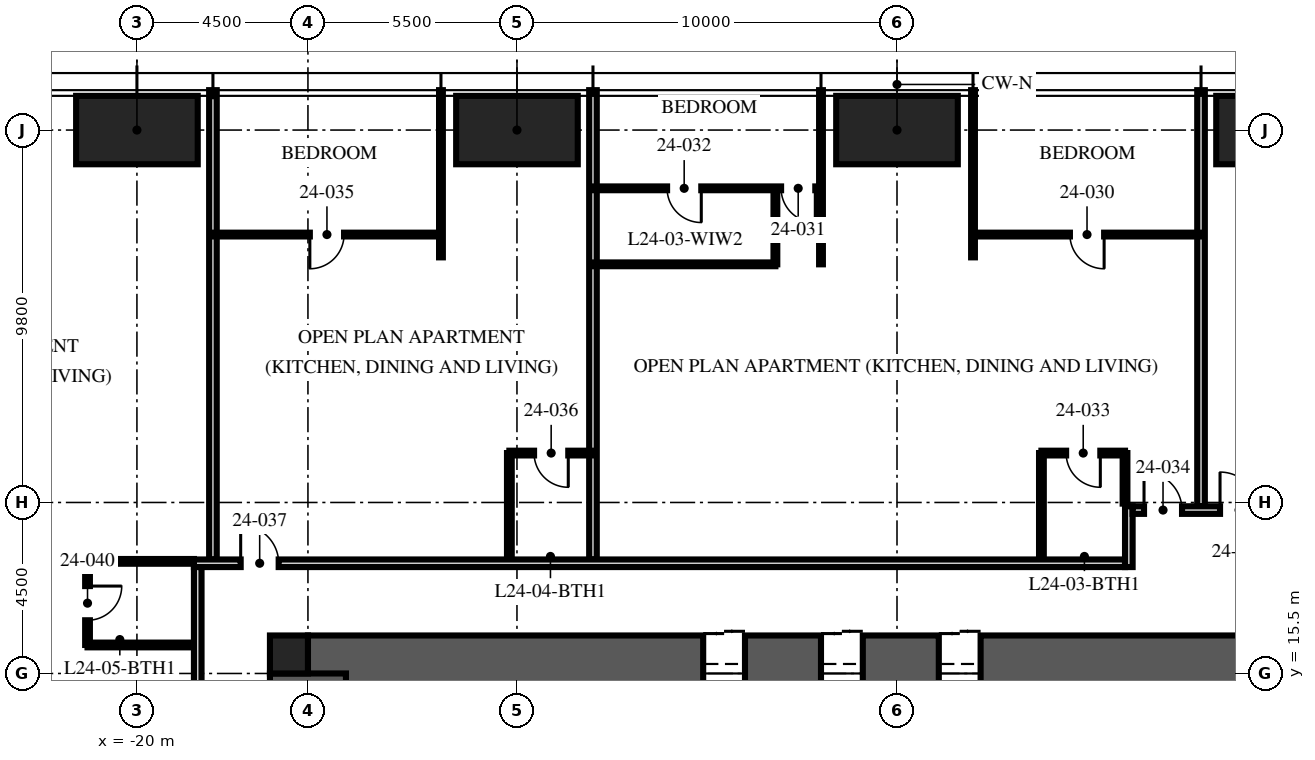
"""IFC4 building model, lengths in metres.
Left out: names, types, materials, properties, quantities, classifications, styles, units other than length and angle.
Written with IfcOpenShell. Run it as: python <this file> out.ifc"""

import sys

from ifc_helpers import new_model, si_unit, direction, frame, frame_2d, origin, origin_2d, place, context, subcontext, project, spatial, rectangle, hollow_rectangle, extrude, element, fill, save


model = new_model("IFC4")
c1 = context("Model", 3, precision=1e-05, world=origin(), true_north=direction((0.0, 1.0)))
c2 = subcontext(c1, "Body", "Model", "MODEL_VIEW")
j1 = project(units=[si_unit("LENGTHUNIT", "METRE"), si_unit("PLANEANGLEUNIT", "RADIAN")], contexts=[c1])
p1 = place(None, origin())
s1 = spatial("IfcSite", under=j1, at=p1, CompositionType="ELEMENT")
p2 = place(p1, origin())
s2 = spatial("IfcBuilding", under=s1, at=p2, CompositionType="ELEMENT")
p3 = place(p2, frame((0.0, 0.0, 96.0)))
s3 = spatial("IfcBuildingStorey", under=s2, at=p3, CompositionType="ELEMENT", Elevation=96.0)
p4 = place(p3, frame((-15.5, 15.5, -0.25), z_axis=(0.0, 0.0, 1.0), x_axis=(1.0, 0.0, 0.0)))
e1 = element("IfcWall", 1, at=p4, inside=s3, PredefinedType="SHEAR", context=c2, shape_type="SweptSolid", body=[
    extrude(rectangle(XDim=31.0, YDim=2.0, at=frame_2d((15.5, 0.0))), origin(), (0.0, 0.0, 1.0), 3.65),
])
p5 = place(p4, frame((10.4, 0.0, 0.25)))
e2 = element("IfcOpeningElement", 2, at=p5, cuts=e1, PredefinedType="OPENING", context=c2, shape_type="SweptSolid", body=[
    extrude(rectangle(XDim=1.1, YDim=2.1, at=frame_2d((0.55, 1.05))), frame((0.0, 1.01, 0.0), z_axis=(0.0, -1.0, 0.0), x_axis=(1.0, 0.0, 0.0)), (0.0, 0.0, 1.0), 2.02),
])
p6 = place(p4, frame((13.5, 0.0, 0.25)))
e3 = element("IfcOpeningElement", 3, at=p6, cuts=e1, PredefinedType="OPENING", context=c2, shape_type="SweptSolid", body=[
    extrude(rectangle(XDim=1.1, YDim=2.1, at=frame_2d((0.55, 1.05))), frame((0.0, 1.01, 0.0), z_axis=(0.0, -1.0, 0.0), x_axis=(1.0, 0.0, 0.0)), (0.0, 0.0, 1.0), 2.02),
])
p7 = place(p4, frame((16.6, 0.0, 0.25)))
e4 = element("IfcOpeningElement", 4, at=p7, cuts=e1, PredefinedType="OPENING", context=c2, shape_type="SweptSolid", body=[
    extrude(rectangle(XDim=1.1, YDim=2.1, at=frame_2d((0.55, 1.05))), frame((0.0, 1.01, 0.0), z_axis=(0.0, -1.0, 0.0), x_axis=(1.0, 0.0, 0.0)), (0.0, 0.0, 1.0), 2.02),
])
p8 = place(p3, frame((-15.5, -15.5, -0.25), z_axis=(0.0, 0.0, 1.0), x_axis=(0.0, 1.0, 0.0)))
e5 = element("IfcWall", 5, at=p8, inside=s3, PredefinedType="SHEAR", context=c2, shape_type="SweptSolid", body=[
    extrude(rectangle(XDim=31.0, YDim=2.0, at=frame_2d((15.5, 0.0))), origin(), (0.0, 0.0, 1.0), 3.65),
])
p9 = place(p8, frame((6.5, 0.0, 0.25)))
e6 = element("IfcOpeningElement", 6, at=p9, cuts=e5, PredefinedType="OPENING", context=c2, shape_type="SweptSolid", body=[
    extrude(rectangle(XDim=1.2, YDim=2.1, at=frame_2d((0.6, 1.05))), frame((0.0, 1.01, 0.0), z_axis=(0.0, -1.0, 0.0), x_axis=(1.0, 0.0, 0.0)), (0.0, 0.0, 1.0), 2.02),
])
p10 = place(p8, frame((23.0, 0.0, 0.25)))
e7 = element("IfcOpeningElement", 7, at=p10, cuts=e5, PredefinedType="OPENING", context=c2, shape_type="SweptSolid", body=[
    extrude(rectangle(XDim=1.8, YDim=2.1, at=frame_2d((0.9, 1.05))), frame((0.0, 1.01, 0.0), z_axis=(0.0, -1.0, 0.0), x_axis=(1.0, 0.0, 0.0)), (0.0, 0.0, 1.0), 2.02),
])
p11 = place(p3, frame((-16.0, 16.0, -0.25), z_axis=(0.0, 0.0, 1.0), x_axis=(1.0, 0.0, 0.0)))
e8 = element("IfcColumn", 8, at=p11, inside=s3, PredefinedType="COLUMN", context=c2, shape_type="SweptSolid", body=[
    extrude(rectangle(XDim=1.0, YDim=1.0, at=origin_2d()), origin(), (0.0, 0.0, 1.0), 3.65),
])
p12 = place(p3, frame((-20.0, 29.8, 0.0), z_axis=(0.0, 0.0, 1.0), x_axis=(1.0, 0.0, 0.0)))
e9 = element("IfcColumn", 9, at=p12, inside=s3, PredefinedType="COLUMN", context=c2, shape_type="SweptSolid", body=[
    extrude(hollow_rectangle(XDim=3.2, YDim=1.8, WallThickness=0.2, at=origin_2d()), origin(), (0.0, 0.0, 1.0), 2.47),
])
p13 = place(p3, frame((-10.0, 29.8, 0.0), z_axis=(0.0, 0.0, 1.0), x_axis=(1.0, 0.0, 0.0)))
e10 = element("IfcColumn", 10, at=p13, inside=s3, PredefinedType="COLUMN", context=c2, shape_type="SweptSolid", body=[
    extrude(hollow_rectangle(XDim=3.2, YDim=1.8, WallThickness=0.2, at=origin_2d()), origin(), (0.0, 0.0, 1.0), 2.62),
])
p14 = place(p3, frame((0.0, 29.8, 0.0), z_axis=(0.0, 0.0, 1.0), x_axis=(1.0, 0.0, 0.0)))
e11 = element("IfcColumn", 11, at=p14, inside=s3, PredefinedType="COLUMN", context=c2, shape_type="SweptSolid", body=[
    extrude(hollow_rectangle(XDim=3.2, YDim=1.8, WallThickness=0.2, at=origin_2d()), origin(), (0.0, 0.0, 1.0), 2.78),
])
p15 = place(p3, frame((10.0, 29.8, 0.0), z_axis=(0.0, 0.0, 1.0), x_axis=(1.0, 0.0, 0.0)))
e12 = element("IfcColumn", 12, at=p15, inside=s3, PredefinedType="COLUMN", context=c2, shape_type="SweptSolid", body=[
    extrude(hollow_rectangle(XDim=3.2, YDim=1.8, WallThickness=0.2, at=origin_2d()), origin(), (0.0, 0.0, 1.0), 2.62),
])
p16 = place(p3, frame((8.0, 19.9, 0.0), z_axis=(0.0, 0.0, 1.0), x_axis=(0.0, 1.0, 0.0)))
e13 = element("IfcWall", 13, at=p16, inside=s3, PredefinedType="PARTITIONING", context=c2, shape_type="SweptSolid", body=[
    extrude(rectangle(XDim=10.95, YDim=0.2, at=frame_2d((5.475, 0.0))), origin(), (0.0, 0.0, 1.0), 2.7),
])
p17 = place(p3, frame((2.0, 26.45, 0.0), z_axis=(0.0, 0.0, 1.0), x_axis=(0.0, 1.0, 0.0)))
e14 = element("IfcWall", 14, at=p17, inside=s3, PredefinedType="PARTITIONING", context=c2, shape_type="SweptSolid", body=[
    extrude(rectangle(XDim=4.4, YDim=0.1, at=frame_2d((2.2, 0.0))), origin(), (0.0, 0.0, 1.0), 2.7),
])
p18 = place(p3, frame((-2.0, 26.267, 0.0), z_axis=(0.0, 0.0, 1.0), x_axis=(0.0, 1.0, 0.0)))
e15 = element("IfcWall", 15, at=p18, inside=s3, PredefinedType="PARTITIONING", context=c2, shape_type="SweptSolid", body=[
    extrude(rectangle(XDim=4.583, YDim=0.1, at=frame_2d((2.292, 0.0))), origin(), (0.0, 0.0, 1.0), 2.7),
])
p19 = place(p3, frame((-8.0, 18.5, 0.0), z_axis=(0.0, 0.0, 1.0), x_axis=(0.0, 1.0, 0.0)))
e16 = element("IfcWall", 16, at=p19, inside=s3, PredefinedType="PARTITIONING", context=c2, shape_type="SweptSolid", body=[
    extrude(rectangle(XDim=12.35, YDim=0.2, at=frame_2d((6.175, 0.0))), origin(), (0.0, 0.0, 1.0), 2.7),
])
p20 = place(p3, frame((-12.0, 26.45, 0.0), z_axis=(0.0, 0.0, 1.0), x_axis=(0.0, 1.0, 0.0)))
e17 = element("IfcWall", 17, at=p20, inside=s3, PredefinedType="PARTITIONING", context=c2, shape_type="SweptSolid", body=[
    extrude(rectangle(XDim=4.4, YDim=0.1, at=frame_2d((2.2, 0.0))), origin(), (0.0, 0.0, 1.0), 2.7),
])
p21 = place(p3, frame((-18.0, 18.5, 0.0), z_axis=(0.0, 0.0, 1.0), x_axis=(0.0, 1.0, 0.0)))
e18 = element("IfcWall", 18, at=p21, inside=s3, PredefinedType="PARTITIONING", context=c2, shape_type="SweptSolid", body=[
    extrude(rectangle(XDim=12.35, YDim=0.2, at=frame_2d((6.175, 0.0))), origin(), (0.0, 0.0, 1.0), 2.3),
])
p22 = place(p3, frame((8.0, 27.05, 0.0), z_axis=(0.0, 0.0, 1.0), x_axis=(-1.0, 0.0, 0.0)))
e19 = element("IfcWall", 19, at=p22, inside=s3, PredefinedType="PARTITIONING", context=c2, shape_type="SweptSolid", body=[
    extrude(rectangle(XDim=6.0, YDim=0.1, at=frame_2d((3.0, 0.0))), origin(), (0.0, 0.0, 1.0), 2.2),
])
p23 = place(p22, frame((2.55, 0.0, 0.0)))
e20 = element("IfcOpeningElement", 20, at=p23, cuts=e19, PredefinedType="OPENING", context=c2, shape_type="SweptSolid", body=[
    extrude(rectangle(XDim=0.9, YDim=2.1, at=frame_2d((0.45, 1.05))), frame((0.0, 0.06, 0.0), z_axis=(0.0, -1.0, 0.0), x_axis=(1.0, 0.0, 0.0)), (0.0, 0.0, 1.0), 0.12),
])
p24 = place(p3, frame((-2.0, 28.267, 0.0), z_axis=(0.0, 0.0, 1.0), x_axis=(-1.0, 0.0, 0.0)))
e21 = element("IfcWall", 21, at=p24, inside=s3, PredefinedType="PARTITIONING", context=c2, shape_type="SweptSolid", body=[
    extrude(rectangle(XDim=6.0, YDim=0.1, at=frame_2d((3.0, 0.0))), origin(), (0.0, 0.0, 1.0), 2.2),
])
p25 = place(p24, frame((0.15, 0.0, 0.0)))
e22 = element("IfcOpeningElement", 22, at=p25, cuts=e21, PredefinedType="OPENING", context=c2, shape_type="SweptSolid", body=[
    extrude(rectangle(XDim=0.9, YDim=2.1, at=frame_2d((0.45, 1.05))), frame((0.0, 0.06, 0.0), z_axis=(0.0, -1.0, 0.0), x_axis=(1.0, 0.0, 0.0)), (0.0, 0.0, 1.0), 0.12),
])
p26 = place(p24, frame((3.15, 0.0, 0.0)))
e23 = element("IfcOpeningElement", 23, at=p26, cuts=e21, PredefinedType="OPENING", context=c2, shape_type="SweptSolid", body=[
    extrude(rectangle(XDim=0.9, YDim=2.1, at=frame_2d((0.45, 1.05))), frame((0.0, 0.06, 0.0), z_axis=(0.0, -1.0, 0.0), x_axis=(1.0, 0.0, 0.0)), (0.0, 0.0, 1.0), 0.12),
])
p27 = place(p3, frame((-3.2, 26.267, 0.0), z_axis=(0.0, 0.0, 1.0), x_axis=(0.0, 1.0, 0.0)))
e24 = element("IfcWall", 24, at=p27, inside=s3, PredefinedType="PARTITIONING", context=c2, shape_type="SweptSolid", body=[
    extrude(rectangle(XDim=2.0, YDim=0.1, at=frame_2d((1.0, 0.0))), origin(), (0.0, 0.0, 1.0), 3.4),
])
p28 = place(p3, frame((-3.2, 26.267, 0.0), z_axis=(0.0, 0.0, 1.0), x_axis=(-1.0, 0.0, 0.0)))
e25 = element("IfcWall", 25, at=p28, inside=s3, PredefinedType="PARTITIONING", context=c2, shape_type="SweptSolid", body=[
    extrude(rectangle(XDim=4.8, YDim=0.1, at=frame_2d((2.4, 0.0))), origin(), (0.0, 0.0, 1.0), 2.2),
])
p29 = place(p3, frame((6.0, 21.3, 0.0), z_axis=(0.0, 0.0, 1.0), x_axis=(-1.0, 0.0, 0.0)))
e26 = element("IfcWall", 26, at=p29, inside=s3, PredefinedType="PARTITIONING", context=c2, shape_type="SweptSolid", body=[
    extrude(rectangle(XDim=2.2, YDim=0.125, at=frame_2d((1.1, 0.0))), origin(), (0.0, 0.0, 1.0), 2.2),
])
p30 = place(p29, frame((0.65, 0.0, 0.0)))
e27 = element("IfcOpeningElement", 27, at=p30, cuts=e26, PredefinedType="OPENING", context=c2, shape_type="SweptSolid", body=[
    extrude(rectangle(XDim=0.9, YDim=2.1, at=frame_2d((0.45, 1.05))), frame((0.0, 0.073, 0.0), z_axis=(0.0, -1.0, 0.0), x_axis=(1.0, 0.0, 0.0)), (0.0, 0.0, 1.0), 0.145),
])
p31 = place(p3, frame((6.0, 19.97, 0.0), z_axis=(0.0, 0.0, 1.0), x_axis=(0.0, 1.0, 0.0)))
e28 = element("IfcWall", 28, at=p31, inside=s3, PredefinedType="PARTITIONING", context=c2, shape_type="SweptSolid", body=[
    extrude(rectangle(XDim=1.33, YDim=0.125, at=frame_2d((0.665, 0.0))), origin(), (0.0, 0.0, 1.0), 3.4),
])
p32 = place(p3, frame((3.8, 18.5, 0.0), z_axis=(0.0, 0.0, 1.0), x_axis=(0.0, 1.0, 0.0)))
e29 = element("IfcWall", 29, at=p32, inside=s3, PredefinedType="PARTITIONING", context=c2, shape_type="SweptSolid", body=[
    extrude(rectangle(XDim=2.8, YDim=0.125, at=frame_2d((1.4, 0.0))), origin(), (0.0, 0.0, 1.0), 3.4),
])
p33 = place(p3, frame((-12.0, 27.05, 0.0), z_axis=(0.0, 0.0, 1.0), x_axis=(-1.0, 0.0, 0.0)))
e30 = element("IfcWall", 30, at=p33, inside=s3, PredefinedType="PARTITIONING", context=c2, shape_type="SweptSolid", body=[
    extrude(rectangle(XDim=6.0, YDim=0.1, at=frame_2d((3.0, 0.0))), origin(), (0.0, 0.0, 1.0), 2.2),
])
p34 = place(p33, frame((2.55, 0.0, 0.0)))
e31 = element("IfcOpeningElement", 31, at=p34, cuts=e30, PredefinedType="OPENING", context=c2, shape_type="SweptSolid", body=[
    extrude(rectangle(XDim=0.9, YDim=2.1, at=frame_2d((0.45, 1.05))), frame((0.0, 0.06, 0.0), z_axis=(0.0, -1.0, 0.0), x_axis=(1.0, 0.0, 0.0)), (0.0, 0.0, 1.0), 0.12),
])
p35 = place(p3, frame((-8.0, 21.3, 0.0), z_axis=(0.0, 0.0, 1.0), x_axis=(-1.0, 0.0, 0.0)))
e32 = element("IfcWall", 32, at=p35, inside=s3, PredefinedType="PARTITIONING", context=c2, shape_type="SweptSolid", body=[
    extrude(rectangle(XDim=2.2, YDim=0.125, at=frame_2d((1.1, 0.0))), origin(), (0.0, 0.0, 1.0), 2.3),
])
p36 = place(p35, frame((0.65, 0.0, 0.0)))
e33 = element("IfcOpeningElement", 33, at=p36, cuts=e32, PredefinedType="OPENING", context=c2, shape_type="SweptSolid", body=[
    extrude(rectangle(XDim=0.9, YDim=2.1, at=frame_2d((0.45, 1.05))), frame((0.0, 0.073, 0.0), z_axis=(0.0, -1.0, 0.0), x_axis=(1.0, 0.0, 0.0)), (0.0, 0.0, 1.0), 0.145),
])
p37 = place(p3, frame((-10.2, 18.5, 0.0), z_axis=(0.0, 0.0, 1.0), x_axis=(0.0, 1.0, 0.0)))
e34 = element("IfcWall", 34, at=p37, inside=s3, PredefinedType="PARTITIONING", context=c2, shape_type="SweptSolid", body=[
    extrude(rectangle(XDim=2.8, YDim=0.125, at=frame_2d((1.4, 0.0))), origin(), (0.0, 0.0, 1.0), 2.3),
])
p38 = place(p3, frame((-21.3, 18.45, 0.0), z_axis=(0.0, 0.0, 1.0), x_axis=(0.0, -1.0, 0.0)))
e35 = element("IfcWall", 35, at=p38, inside=s3, PredefinedType="PARTITIONING", context=c2, shape_type="SweptSolid", body=[
    extrude(rectangle(XDim=2.2, YDim=0.125, at=frame_2d((1.1, 0.0))), origin(), (0.0, 0.0, 1.0), 3.4),
])
p39 = place(p38, frame((0.65, 0.0, 0.0)))
e36 = element("IfcOpeningElement", 36, at=p39, cuts=e35, PredefinedType="OPENING", context=c2, shape_type="SweptSolid", body=[
    extrude(rectangle(XDim=0.9, YDim=2.1, at=frame_2d((0.45, 1.05))), frame((0.0, 0.073, 0.0), z_axis=(0.0, -1.0, 0.0), x_axis=(1.0, 0.0, 0.0)), (0.0, 0.0, 1.0), 0.145),
])
p40 = place(p3, frame((-18.5, 18.45, 0.0), z_axis=(0.0, 0.0, 1.0), x_axis=(-1.0, 0.0, 0.0)))
e37 = element("IfcWall", 37, at=p40, inside=s3, PredefinedType="PARTITIONING", context=c2, shape_type="SweptSolid", body=[
    extrude(rectangle(XDim=2.8, YDim=0.125, at=frame_2d((1.4, 0.0))), origin(), (0.0, 0.0, 1.0), 2.3),
])
p41 = place(p3, frame((-18.5, 16.25, 0.0), z_axis=(0.0, 0.0, 1.0), x_axis=(-1.0, 0.0, 0.0)))
e38 = element("IfcWall", 38, at=p41, inside=s3, PredefinedType="PARTITIONING", context=c2, shape_type="SweptSolid", body=[
    extrude(rectangle(XDim=2.8, YDim=0.125, at=frame_2d((1.4, 0.0))), origin(), (0.0, 0.0, 1.0), 3.4),
])
p42 = place(p3, frame((-18.5, 18.4, 0.0), z_axis=(0.0, 0.0, 1.0), x_axis=(1.0, 0.0, 0.0)))
e39 = element("IfcWall", 39, at=p42, inside=s3, PredefinedType="PARTITIONING", context=c2, shape_type="SweptSolid", body=[
    extrude(rectangle(XDim=24.5, YDim=0.2, at=frame_2d((12.25, 0.0))), origin(), (0.0, 0.0, 1.0), 2.2),
])
p43 = place(p42, frame((1.23, 0.0, 0.0)))
e40 = element("IfcOpeningElement", 40, at=p43, cuts=e39, PredefinedType="OPENING", context=c2, shape_type="SweptSolid", body=[
    extrude(rectangle(XDim=1.0, YDim=2.2, at=frame_2d((0.5, 1.1))), frame((0.0, 0.11, 0.0), z_axis=(0.0, -1.0, 0.0), x_axis=(1.0, 0.0, 0.0)), (0.0, 0.0, 1.0), 0.22),
])
p44 = place(p3, frame((6.1, 18.3, 0.0), z_axis=(0.0, 0.0, 1.0), x_axis=(0.0, 1.0, 0.0)))
e41 = element("IfcWall", 41, at=p44, inside=s3, PredefinedType="PARTITIONING", context=c2, shape_type="SweptSolid", body=[
    extrude(rectangle(XDim=1.6, YDim=0.2, at=frame_2d((0.8, 0.0))), origin(), (0.0, 0.0, 1.0), 3.4),
])
p45 = place(p3, frame((6.2, 19.8, 0.0), z_axis=(0.0, 0.0, 1.0), x_axis=(1.0, 0.0, 0.0)))
e42 = element("IfcWall", 42, at=p45, inside=s3, PredefinedType="PARTITIONING", context=c2, shape_type="SweptSolid", body=[
    extrude(rectangle(XDim=3.6, YDim=0.2, at=frame_2d((1.8, 0.0))), origin(), (0.0, 0.0, 1.0), 2.3),
])
p46 = place(p45, frame((2.3, 0.0, 0.0)))
e43 = element("IfcOpeningElement", 43, at=p46, cuts=e42, PredefinedType="OPENING", context=c2, shape_type="SweptSolid", body=[
    extrude(rectangle(XDim=1.0, YDim=2.2, at=frame_2d((0.5, 1.1))), frame((0.0, 0.11, 0.0), z_axis=(0.0, -1.0, 0.0), x_axis=(1.0, 0.0, 0.0)), (0.0, 0.0, 1.0), 0.22),
])
p47 = place(p45, frame((0.3, 0.0, 0.0)))
e44 = element("IfcOpeningElement", 44, at=p47, cuts=e42, PredefinedType="OPENING", context=c2, shape_type="SweptSolid", body=[
    extrude(rectangle(XDim=1.0, YDim=2.2, at=frame_2d((0.5, 1.1))), frame((0.0, 0.11, 0.0), z_axis=(0.0, -1.0, 0.0), x_axis=(1.0, 0.0, 0.0)), (0.0, 0.0, 1.0), 0.22),
])
p48 = place(p3, frame((-18.4, 18.3, 0.0), z_axis=(0.0, 0.0, 1.0), x_axis=(0.0, -1.0, 0.0)))
e45 = element("IfcWall", 45, at=p48, inside=s3, PredefinedType="PARTITIONING", context=c2, shape_type="SweptSolid", body=[
    extrude(rectangle(XDim=14.3, YDim=0.2, at=frame_2d((7.15, 0.0))), origin(), (0.0, 0.0, 1.0), 2.2),
])
p49 = place(p48, frame((8.7, 0.0, 0.0)))
e46 = element("IfcOpeningElement", 46, at=p49, cuts=e45, PredefinedType="OPENING", context=c2, shape_type="SweptSolid", body=[
    extrude(rectangle(XDim=1.0, YDim=2.2, at=frame_2d((0.5, 1.1))), frame((0.0, 0.11, 0.0), z_axis=(0.0, -1.0, 0.0), x_axis=(1.0, 0.0, 0.0)), (0.0, 0.0, 1.0), 0.22),
])
p50 = place(p5, origin())
e47 = element("IfcDoor", 47, at=p50, inside=s3, OperationType="DOUBLE_DOOR_SLIDING", PredefinedType="DOOR", context=c2, shape_type="SweptSolid", body=[
    extrude(rectangle(XDim=1.1, YDim=2.1, at=frame_2d((0.55, 1.05))), frame((0.0, 0.025, 0.0), z_axis=(0.0, -1.0, 0.0), x_axis=(1.0, 0.0, 0.0)), (0.0, 0.0, 1.0), 0.05),
])
fill(e2, e47)
p51 = place(p6, origin())
e48 = element("IfcDoor", 48, at=p51, inside=s3, OperationType="DOUBLE_DOOR_SLIDING", PredefinedType="DOOR", context=c2, shape_type="SweptSolid", body=[
    extrude(rectangle(XDim=1.1, YDim=2.1, at=frame_2d((0.55, 1.05))), frame((0.0, 0.025, 0.0), z_axis=(0.0, -1.0, 0.0), x_axis=(1.0, 0.0, 0.0)), (0.0, 0.0, 1.0), 0.05),
])
fill(e3, e48)
p52 = place(p7, origin())
e49 = element("IfcDoor", 49, at=p52, inside=s3, OperationType="DOUBLE_DOOR_SLIDING", PredefinedType="DOOR", context=c2, shape_type="SweptSolid", body=[
    extrude(rectangle(XDim=1.1, YDim=2.1, at=frame_2d((0.55, 1.05))), frame((0.0, 0.025, 0.0), z_axis=(0.0, -1.0, 0.0), x_axis=(1.0, 0.0, 0.0)), (0.0, 0.0, 1.0), 0.05),
])
fill(e4, e49)
p53 = place(p46, origin())
e50 = element("IfcDoor", 50, at=p53, inside=s3, OperationType="SINGLE_SWING_LEFT", PredefinedType="DOOR", context=c2, shape_type="SweptSolid", body=[
    extrude(rectangle(XDim=1.0, YDim=2.2, at=frame_2d((0.5, 1.1))), frame((0.0, 0.025, 0.0), z_axis=(0.0, -1.0, 0.0), x_axis=(1.0, 0.0, 0.0)), (0.0, 0.0, 1.0), 0.05),
])
fill(e43, e50)
p54 = place(p23, origin())
e51 = element("IfcDoor", 51, at=p54, inside=s3, OperationType="SINGLE_SWING_LEFT", PredefinedType="DOOR", context=c2, shape_type="SweptSolid", body=[
    extrude(rectangle(XDim=0.9, YDim=2.1, at=frame_2d((0.45, 1.05))), frame((0.0, 0.025, 0.0), z_axis=(0.0, -1.0, 0.0), x_axis=(1.0, 0.0, 0.0)), (0.0, 0.0, 1.0), 0.05),
])
fill(e20, e51)
p55 = place(p25, origin())
e52 = element("IfcDoor", 52, at=p55, inside=s3, OperationType="SINGLE_SWING_LEFT", PredefinedType="DOOR", context=c2, shape_type="SweptSolid", body=[
    extrude(rectangle(XDim=0.9, YDim=2.1, at=frame_2d((0.45, 1.05))), frame((0.0, 0.025, 0.0), z_axis=(0.0, -1.0, 0.0), x_axis=(1.0, 0.0, 0.0)), (0.0, 0.0, 1.0), 0.05),
])
fill(e22, e52)
p56 = place(p26, origin())
e53 = element("IfcDoor", 53, at=p56, inside=s3, OperationType="SINGLE_SWING_LEFT", PredefinedType="DOOR", context=c2, shape_type="SweptSolid", body=[
    extrude(rectangle(XDim=0.9, YDim=2.1, at=frame_2d((0.45, 1.05))), frame((0.0, 0.025, 0.0), z_axis=(0.0, -1.0, 0.0), x_axis=(1.0, 0.0, 0.0)), (0.0, 0.0, 1.0), 0.05),
])
fill(e23, e53)
p57 = place(p30, origin())
e54 = element("IfcDoor", 54, at=p57, inside=s3, OperationType="SINGLE_SWING_LEFT", PredefinedType="DOOR", context=c2, shape_type="SweptSolid", body=[
    extrude(rectangle(XDim=0.9, YDim=2.1, at=frame_2d((0.45, 1.05))), frame((0.0, 0.025, 0.0), z_axis=(0.0, -1.0, 0.0), x_axis=(1.0, 0.0, 0.0)), (0.0, 0.0, 1.0), 0.05),
])
fill(e27, e54)
p58 = place(p47, origin())
e55 = element("IfcDoor", 55, at=p58, inside=s3, OperationType="SINGLE_SWING_LEFT", PredefinedType="DOOR", context=c2, shape_type="SweptSolid", body=[
    extrude(rectangle(XDim=1.0, YDim=2.2, at=frame_2d((0.5, 1.1))), frame((0.0, 0.025, 0.0), z_axis=(0.0, -1.0, 0.0), x_axis=(1.0, 0.0, 0.0)), (0.0, 0.0, 1.0), 0.05),
])
fill(e44, e55)
p59 = place(p34, origin())
e56 = element("IfcDoor", 56, at=p59, inside=s3, OperationType="SINGLE_SWING_RIGHT", PredefinedType="DOOR", context=c2, shape_type="SweptSolid", body=[
    extrude(rectangle(XDim=0.9, YDim=2.1, at=frame_2d((0.45, 1.05))), frame((0.0, 0.025, 0.0), z_axis=(0.0, -1.0, 0.0), x_axis=(1.0, 0.0, 0.0)), (0.0, 0.0, 1.0), 0.05),
])
fill(e31, e56)
p60 = place(p36, origin())
e57 = element("IfcDoor", 57, at=p60, inside=s3, OperationType="SINGLE_SWING_LEFT", PredefinedType="DOOR", context=c2, shape_type="SweptSolid", body=[
    extrude(rectangle(XDim=0.9, YDim=2.1, at=frame_2d((0.45, 1.05))), frame((0.0, 0.025, 0.0), z_axis=(0.0, -1.0, 0.0), x_axis=(1.0, 0.0, 0.0)), (0.0, 0.0, 1.0), 0.05),
])
fill(e33, e57)
p61 = place(p43, origin())
e58 = element("IfcDoor", 58, at=p61, inside=s3, OperationType="SINGLE_SWING_LEFT", PredefinedType="DOOR", context=c2, shape_type="SweptSolid", body=[
    extrude(rectangle(XDim=1.0, YDim=2.2, at=frame_2d((0.5, 1.1))), frame((0.0, 0.025, 0.0), z_axis=(0.0, -1.0, 0.0), x_axis=(1.0, 0.0, 0.0)), (0.0, 0.0, 1.0), 0.05),
])
fill(e40, e58)
p62 = place(p39, origin())
e59 = element("IfcDoor", 59, at=p62, inside=s3, OperationType="SINGLE_SWING_LEFT", PredefinedType="DOOR", context=c2, shape_type="SweptSolid", body=[
    extrude(rectangle(XDim=0.9, YDim=2.1, at=frame_2d((0.45, 1.05))), frame((0.0, 0.025, 0.0), z_axis=(0.0, -1.0, 0.0), x_axis=(1.0, 0.0, 0.0)), (0.0, 0.0, 1.0), 0.05),
])
fill(e36, e59)
save(model, sys.argv[1])
